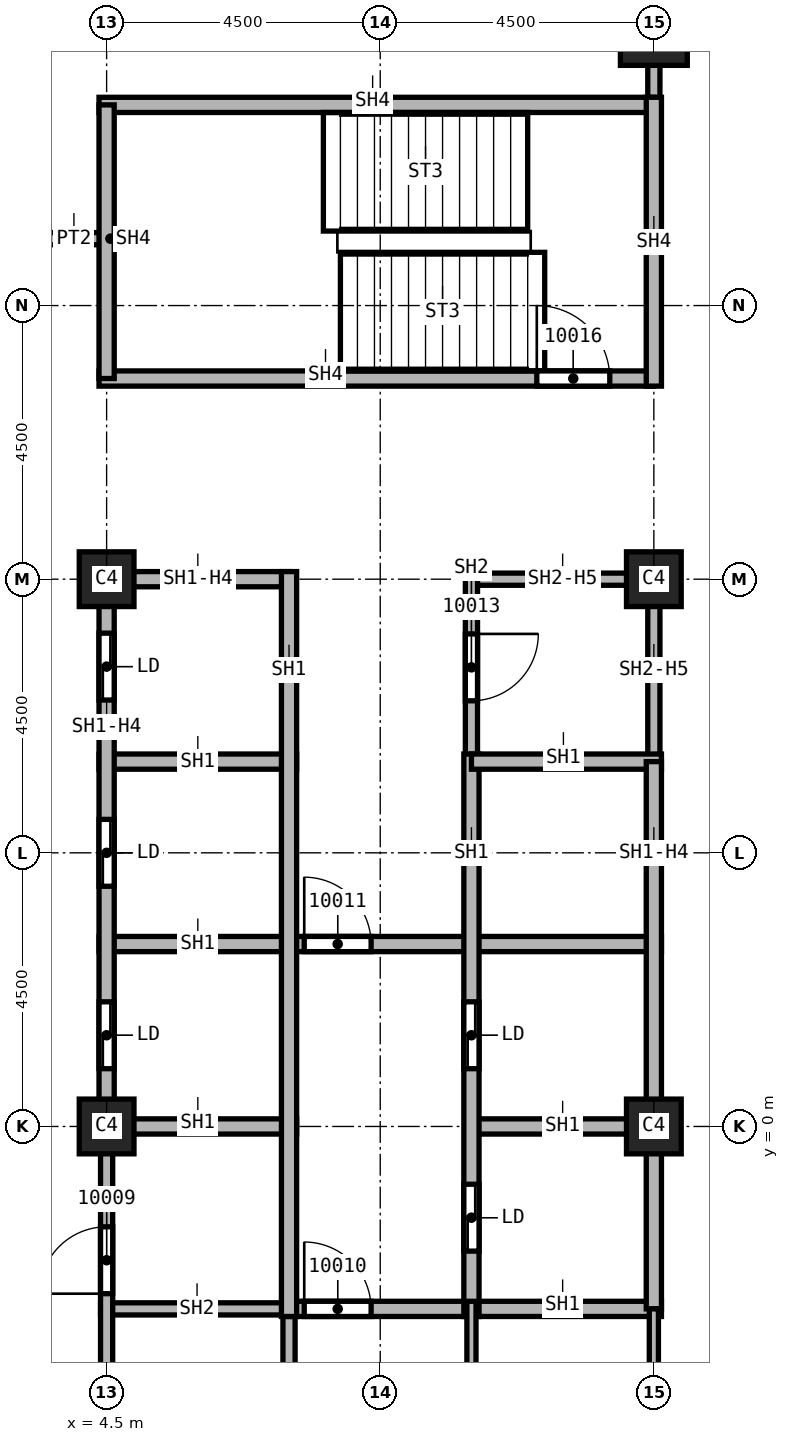
"""IFC4 building model, lengths in metres.
Left out: names, types, materials, properties, quantities, classifications, styles, units other than length and angle.
Written with IfcOpenShell. Run it as: python <this file> out.ifc"""

import sys

from ifc_helpers import new_model, si_unit, direction, frame, frame_2d, origin, origin_2d, place, context, subcontext, project, spatial, rectangle, extrude, element, fill, save


model = new_model("IFC4")
c1 = context("Model", 3, precision=1e-05, world=origin(), true_north=direction((0.0, 1.0)))
c2 = subcontext(c1, "Body", "Model", "MODEL_VIEW")
j1 = project(units=[si_unit("LENGTHUNIT", "METRE"), si_unit("PLANEANGLEUNIT", "RADIAN")], contexts=[c1])
p1 = place(None, origin())
s1 = spatial("IfcSite", under=j1, at=p1, CompositionType="ELEMENT")
p2 = place(p1, origin())
s2 = spatial("IfcBuilding", under=s1, at=p2, CompositionType="ELEMENT")
p3 = place(p2, frame((0.0, 0.0, 170.0)))
s3 = spatial("IfcBuildingStorey", under=s2, at=p3, CompositionType="ELEMENT", Elevation=170.0)
p4 = place(p3, frame((13.5, 18.0, 0.0), z_axis=(0.0, 0.0, 1.0), x_axis=(1.0, 0.0, 0.0)))
e1 = element("IfcColumn", 1, at=p4, inside=s3, PredefinedType="COLUMN", context=c2, shape_type="SweptSolid", body=[
    extrude(rectangle(XDim=1.1, YDim=1.1, at=origin_2d()), origin(), (0.0, 0.0, 1.0), 3.7),
])
for number, where, z_axis, x_axis in (
    (2, (4.5, 0.0, 0.0), (0.0, 0.0, 1.0), (1.0, 0.0, 0.0)),
    (3, (4.5, 9.0, 0.0), (0.0, 0.0, 1.0), (1.0, 0.0, 0.0)),
    (4, (13.5, 0.0, 0.0), (0.0, 0.0, 1.0), (1.0, 0.0, 0.0)),
    (5, (13.5, 9.0, 0.0), (0.0, 0.0, 1.0), (1.0, 0.0, 0.0)),
):
    element("IfcColumn", number, at=place(p3, frame(where, z_axis=z_axis, x_axis=x_axis)), inside=s3, PredefinedType="COLUMN", context=c2, shape_type="SweptSolid", body=[
        extrude(rectangle(XDim=0.9, YDim=0.9, at=origin_2d()), origin(), (0.0, 0.0, 1.0), 3.7),
    ])
p5 = place(p3, frame((3.55, 14.6, 0.0), z_axis=(0.0, 0.0, 1.0), x_axis=(1.0, 0.0, 0.0)))
e6 = element("IfcWall", 6, at=p5, inside=s3, PredefinedType="PARTITIONING", context=c2, shape_type="SweptSolid", body=[
    extrude(rectangle(XDim=0.95, YDim=0.2, at=frame_2d((0.475, 0.0))), origin(), (0.0, 0.0, 1.0), 3.7),
])
p6 = place(p3, frame((13.5, 16.675, 0.0), z_axis=(0.0, 0.0, 1.0), x_axis=(0.0, 1.0, 0.0)))
e7 = element("IfcWall", 7, at=p6, inside=s3, PredefinedType="PARTITIONING", context=c2, shape_type="SweptSolid", body=[
    extrude(rectangle(XDim=6.375, YDim=0.2, at=frame_2d((3.188, 0.0))), origin(), (0.0, 0.0, 1.0), 3.7),
])
p7 = place(p6, frame((3.55, 0.0, 0.0)))
e8 = element("IfcOpeningElement", 8, at=p7, cuts=e7, PredefinedType="OPENING", context=c2, shape_type="SweptSolid", body=[
    extrude(rectangle(XDim=1.0, YDim=2.1, at=frame_2d((0.5, 1.05))), frame((0.0, 0.1, 0.0), z_axis=(0.0, -1.0, 0.0), x_axis=(1.0, 0.0, 0.0)), (0.0, 0.0, 1.0), 0.2),
])
p8 = place(p3, frame((4.4, -3.0, 0.0), z_axis=(0.0, 0.0, 1.0), x_axis=(1.0, 0.0, 0.0)))
e9 = element("IfcWall", 9, at=p8, inside=s3, PredefinedType="SOLIDWALL", context=c2, shape_type="SweptSolid", body=[
    extrude(rectangle(XDim=3.225, YDim=0.2, at=frame_2d((1.613, 0.0))), origin(), (0.0, 0.0, 1.0), 3.7),
])
p9 = place(p3, frame((4.5, -9.1, 0.0), z_axis=(0.0, 0.0, 1.0), x_axis=(0.0, 1.0, 0.0)))
e10 = element("IfcWall", 10, at=p9, inside=s3, PredefinedType="SOLIDWALL", context=c2, shape_type="SweptSolid", body=[
    extrude(rectangle(XDim=9.1, YDim=0.2, at=frame_2d((4.55, 0.0))), origin(), (0.0, 0.0, 1.0), 2.938),
])
p10 = place(p9, frame((0.85, 0.0, 0.0)))
e11 = element("IfcOpeningElement", 11, at=p10, cuts=e10, PredefinedType="OPENING", context=c2, shape_type="SweptSolid", body=[
    extrude(rectangle(XDim=1.1, YDim=2.1, at=frame_2d((0.55, 1.05))), frame((0.0, 0.1, 0.0), z_axis=(0.0, -1.0, 0.0), x_axis=(1.0, 0.0, 0.0)), (0.0, 0.0, 1.0), 0.2),
])
p11 = place(p9, frame((6.35, 0.0, 0.0)))
e12 = element("IfcOpeningElement", 12, at=p11, cuts=e10, PredefinedType="OPENING", context=c2, shape_type="SweptSolid", body=[
    extrude(rectangle(XDim=1.1, YDim=2.1, at=frame_2d((0.55, 1.05))), frame((0.0, 0.1, 0.0), z_axis=(0.0, -1.0, 0.0), x_axis=(1.0, 0.0, 0.0)), (0.0, 0.0, 1.0), 0.2),
])
p12 = place(p3, frame((7.5, -2.875, 0.0), z_axis=(0.0, 0.0, 1.0), x_axis=(0.0, -1.0, 0.0)))
e13 = element("IfcWall", 13, at=p12, inside=s3, PredefinedType="SOLIDWALL", context=c2, shape_type="SweptSolid", body=[
    extrude(rectangle(XDim=6.225, YDim=0.2, at=frame_2d((3.113, 0.0))), origin(), (0.0, 0.0, 1.0), 3.7),
])
p13 = place(p3, frame((10.5, 9.0, 0.0), z_axis=(0.0, 0.0, 1.0), x_axis=(1.0, 0.0, 0.0)))
e14 = element("IfcWall", 14, at=p13, inside=s3, PredefinedType="SOLIDWALL", context=c2, shape_type="SweptSolid", body=[
    extrude(rectangle(XDim=3.0, YDim=0.2, at=frame_2d((1.5, 0.0))), origin(), (0.0, 0.0, 1.0), 2.938),
])
p14 = place(p3, frame((10.5, 9.1, 0.0), z_axis=(0.0, 0.0, 1.0), x_axis=(0.0, -1.0, 0.0)))
e15 = element("IfcWall", 15, at=p14, inside=s3, PredefinedType="SOLIDWALL", context=c2, shape_type="SweptSolid", body=[
    extrude(rectangle(XDim=3.225, YDim=0.2, at=frame_2d((1.613, 0.0))), origin(), (0.0, 0.0, 1.0), 3.7),
])
p15 = place(p14, frame((1.0, 0.0, 0.0)))
e16 = element("IfcOpeningElement", 16, at=p15, cuts=e15, PredefinedType="OPENING", context=c2, shape_type="SweptSolid", body=[
    extrude(rectangle(XDim=1.1, YDim=2.1, at=frame_2d((0.55, 1.05))), frame((0.0, 0.1, 0.0), z_axis=(0.0, -1.0, 0.0), x_axis=(1.0, 0.0, 0.0)), (0.0, 0.0, 1.0), 0.2),
])
p16 = place(p3, frame((13.5, 9.1, 0.0), z_axis=(0.0, 0.0, 1.0), x_axis=(0.0, -1.0, 0.0)))
e17 = element("IfcWall", 17, at=p16, inside=s3, PredefinedType="SOLIDWALL", context=c2, shape_type="SweptSolid", body=[
    extrude(rectangle(XDim=3.1, YDim=0.2, at=frame_2d((1.55, 0.0))), origin(), (0.0, 0.0, 1.0), 2.938),
])
p17 = place(p3, frame((4.375, 0.0, 0.0), z_axis=(0.0, 0.0, 1.0), x_axis=(1.0, 0.0, 0.0)))
e18 = element("IfcWall", 18, at=p17, inside=s3, PredefinedType="SOLIDWALL", context=c2, shape_type="SweptSolid", body=[
    extrude(rectangle(XDim=3.25, YDim=0.25, at=frame_2d((1.625, 0.0))), origin(), (0.0, 0.0, 1.0), 3.7),
])
p18 = place(p3, frame((4.375, 3.0, 0.0), z_axis=(0.0, 0.0, 1.0), x_axis=(1.0, 0.0, 0.0)))
e19 = element("IfcWall", 19, at=p18, inside=s3, PredefinedType="SOLIDWALL", context=c2, shape_type="SweptSolid", body=[
    extrude(rectangle(XDim=9.25, YDim=0.25, at=frame_2d((4.625, 0.0))), origin(), (0.0, 0.0, 1.0), 3.7),
])
p19 = place(p18, frame((3.375, 0.0, 0.0)))
e20 = element("IfcOpeningElement", 20, at=p19, cuts=e19, PredefinedType="OPENING", context=c2, shape_type="SweptSolid", body=[
    extrude(rectangle(XDim=1.1, YDim=2.1, at=frame_2d((0.55, 1.05))), frame((0.0, 0.125, 0.0), z_axis=(0.0, -1.0, 0.0), x_axis=(1.0, 0.0, 0.0)), (0.0, 0.0, 1.0), 0.25),
])
p20 = place(p3, frame((4.375, 6.0, 0.0), z_axis=(0.0, 0.0, 1.0), x_axis=(1.0, 0.0, 0.0)))
e21 = element("IfcWall", 21, at=p20, inside=s3, PredefinedType="SOLIDWALL", context=c2, shape_type="SweptSolid", body=[
    extrude(rectangle(XDim=3.25, YDim=0.25, at=frame_2d((1.625, 0.0))), origin(), (0.0, 0.0, 1.0), 3.7),
])
p21 = place(p3, frame((4.5, 0.0, 0.0), z_axis=(0.0, 0.0, 1.0), x_axis=(0.0, 1.0, 0.0)))
e22 = element("IfcWall", 22, at=p21, inside=s3, PredefinedType="SOLIDWALL", context=c2, shape_type="SweptSolid", body=[
    extrude(rectangle(XDim=9.125, YDim=0.25, at=frame_2d((4.562, 0.0))), origin(), (0.0, 0.0, 1.0), 2.938),
])
p22 = place(p21, frame((0.95, 0.0, 0.0)))
e23 = element("IfcOpeningElement", 23, at=p22, cuts=e22, PredefinedType="OPENING", context=c2, shape_type="SweptSolid", body=[
    extrude(rectangle(XDim=1.1, YDim=2.1, at=frame_2d((0.55, 1.05))), frame((0.0, 0.125, 0.0), z_axis=(0.0, -1.0, 0.0), x_axis=(1.0, 0.0, 0.0)), (0.0, 0.0, 1.0), 0.25),
])
p23 = place(p21, frame((3.95, 0.0, 0.0)))
e24 = element("IfcOpeningElement", 24, at=p23, cuts=e22, PredefinedType="OPENING", context=c2, shape_type="SweptSolid", body=[
    extrude(rectangle(XDim=1.1, YDim=2.1, at=frame_2d((0.55, 1.05))), frame((0.0, 0.125, 0.0), z_axis=(0.0, -1.0, 0.0), x_axis=(1.0, 0.0, 0.0)), (0.0, 0.0, 1.0), 0.25),
])
p24 = place(p21, frame((7.012, 0.0, 0.0)))
e25 = element("IfcOpeningElement", 25, at=p24, cuts=e22, PredefinedType="OPENING", context=c2, shape_type="SweptSolid", body=[
    extrude(rectangle(XDim=1.1, YDim=2.1, at=frame_2d((0.55, 1.05))), frame((0.0, 0.125, 0.0), z_axis=(0.0, -1.0, 0.0), x_axis=(1.0, 0.0, 0.0)), (0.0, 0.0, 1.0), 0.25),
])
p25 = place(p3, frame((4.5, 9.0, 0.0), z_axis=(0.0, 0.0, 1.0), x_axis=(1.0, 0.0, 0.0)))
e26 = element("IfcWall", 26, at=p25, inside=s3, PredefinedType="SOLIDWALL", context=c2, shape_type="SweptSolid", body=[
    extrude(rectangle(XDim=3.0, YDim=0.25, at=frame_2d((1.5, 0.0))), origin(), (0.0, 0.0, 1.0), 2.938),
])
p26 = place(p3, frame((7.5, -3.0, 0.0), z_axis=(0.0, 0.0, 1.0), x_axis=(1.0, 0.0, 0.0)))
e27 = element("IfcWall", 27, at=p26, inside=s3, PredefinedType="SOLIDWALL", context=c2, shape_type="SweptSolid", body=[
    extrude(rectangle(XDim=6.125, YDim=0.25, at=frame_2d((3.062, 0.0))), origin(), (0.0, 0.0, 1.0), 3.7),
])
p27 = place(p26, frame((0.25, 0.0, 0.0)))
e28 = element("IfcOpeningElement", 28, at=p27, cuts=e27, PredefinedType="OPENING", context=c2, shape_type="SweptSolid", body=[
    extrude(rectangle(XDim=1.1, YDim=2.1, at=frame_2d((0.55, 1.05))), frame((0.0, 0.125, 0.0), z_axis=(0.0, -1.0, 0.0), x_axis=(1.0, 0.0, 0.0)), (0.0, 0.0, 1.0), 0.25),
])
p28 = place(p3, frame((7.5, 9.125, 0.0), z_axis=(0.0, 0.0, 1.0), x_axis=(0.0, -1.0, 0.0)))
e29 = element("IfcWall", 29, at=p28, inside=s3, PredefinedType="SOLIDWALL", context=c2, shape_type="SweptSolid", body=[
    extrude(rectangle(XDim=12.25, YDim=0.25, at=frame_2d((6.125, 0.0))), origin(), (0.0, 0.0, 1.0), 3.7),
])
p29 = place(p3, frame((10.5, 0.0, 0.0), z_axis=(0.0, 0.0, 1.0), x_axis=(1.0, 0.0, 0.0)))
e30 = element("IfcWall", 30, at=p29, inside=s3, PredefinedType="SOLIDWALL", context=c2, shape_type="SweptSolid", body=[
    extrude(rectangle(XDim=3.125, YDim=0.25, at=frame_2d((1.562, 0.0))), origin(), (0.0, 0.0, 1.0), 3.7),
])
p30 = place(p3, frame((10.5, 6.125, 0.0), z_axis=(0.0, 0.0, 1.0), x_axis=(0.0, -1.0, 0.0)))
e31 = element("IfcWall", 31, at=p30, inside=s3, PredefinedType="SOLIDWALL", context=c2, shape_type="SweptSolid", body=[
    extrude(rectangle(XDim=9.25, YDim=0.25, at=frame_2d((4.625, 0.0))), origin(), (0.0, 0.0, 1.0), 3.7),
])
p31 = place(p30, frame((7.075, 0.0, 0.0)))
e32 = element("IfcOpeningElement", 32, at=p31, cuts=e31, PredefinedType="OPENING", context=c2, shape_type="SweptSolid", body=[
    extrude(rectangle(XDim=1.1, YDim=2.1, at=frame_2d((0.55, 1.05))), frame((0.0, 0.125, 0.0), z_axis=(0.0, -1.0, 0.0), x_axis=(1.0, 0.0, 0.0)), (0.0, 0.0, 1.0), 0.25),
])
p32 = place(p30, frame((4.075, 0.0, 0.0)))
e33 = element("IfcOpeningElement", 33, at=p32, cuts=e31, PredefinedType="OPENING", context=c2, shape_type="SweptSolid", body=[
    extrude(rectangle(XDim=1.1, YDim=2.1, at=frame_2d((0.55, 1.05))), frame((0.0, 0.125, 0.0), z_axis=(0.0, -1.0, 0.0), x_axis=(1.0, 0.0, 0.0)), (0.0, 0.0, 1.0), 0.25),
])
p33 = place(p3, frame((10.5, 6.0, 0.0), z_axis=(0.0, 0.0, 1.0), x_axis=(1.0, 0.0, 0.0)))
e34 = element("IfcWall", 34, at=p33, inside=s3, PredefinedType="SOLIDWALL", context=c2, shape_type="SweptSolid", body=[
    extrude(rectangle(XDim=3.125, YDim=0.25, at=frame_2d((1.562, 0.0))), origin(), (0.0, 0.0, 1.0), 3.7),
])
p34 = place(p3, frame((13.5, 6.0, 0.0), z_axis=(0.0, 0.0, 1.0), x_axis=(0.0, -1.0, 0.0)))
e35 = element("IfcWall", 35, at=p34, inside=s3, PredefinedType="SOLIDWALL", context=c2, shape_type="SweptSolid", body=[
    extrude(rectangle(XDim=9.0, YDim=0.25, at=frame_2d((4.5, 0.0))), origin(), (0.0, 0.0, 1.0), 2.938),
])
p35 = place(p3, frame((4.375, 12.3, 0.0), z_axis=(0.0, 0.0, 1.0), x_axis=(1.0, 0.0, 0.0)))
e36 = element("IfcWall", 36, at=p35, inside=s3, PredefinedType="SOLIDWALL", context=c2, shape_type="SweptSolid", body=[
    extrude(rectangle(XDim=9.125, YDim=0.25, at=frame_2d((4.562, 0.0))), origin(), (0.0, 0.0, 1.0), 3.7),
])
p36 = place(p35, frame((7.2, 0.0, 0.0)))
e37 = element("IfcOpeningElement", 37, at=p36, cuts=e36, PredefinedType="OPENING", context=c2, shape_type="SweptSolid", body=[
    extrude(rectangle(XDim=1.2, YDim=2.1, at=frame_2d((0.6, 1.05))), frame((0.0, 0.125, 0.0), z_axis=(0.0, -1.0, 0.0), x_axis=(1.0, 0.0, 0.0)), (0.0, 0.0, 1.0), 0.25),
])
p37 = place(p3, frame((4.375, 16.8, 0.0), z_axis=(0.0, 0.0, 1.0), x_axis=(1.0, 0.0, 0.0)))
e38 = element("IfcWall", 38, at=p37, inside=s3, PredefinedType="SOLIDWALL", context=c2, shape_type="SweptSolid", body=[
    extrude(rectangle(XDim=9.125, YDim=0.25, at=frame_2d((4.562, 0.0))), origin(), (0.0, 0.0, 1.0), 3.7),
])
p38 = place(p3, frame((4.5, 12.3, 0.0), z_axis=(0.0, 0.0, 1.0), x_axis=(0.0, 1.0, 0.0)))
e39 = element("IfcWall", 39, at=p38, inside=s3, PredefinedType="SOLIDWALL", context=c2, shape_type="SweptSolid", body=[
    extrude(rectangle(XDim=4.5, YDim=0.25, at=frame_2d((2.25, 0.0))), origin(), (0.0, 0.0, 1.0), 3.7),
])
p39 = place(p3, frame((13.5, 12.175, 0.0), z_axis=(0.0, 0.0, 1.0), x_axis=(0.0, 1.0, 0.0)))
e40 = element("IfcWall", 40, at=p39, inside=s3, PredefinedType="SOLIDWALL", context=c2, shape_type="SweptSolid", body=[
    extrude(rectangle(XDim=4.75, YDim=0.25, at=frame_2d((2.375, 0.0))), origin(), (0.0, 0.0, 1.0), 3.7),
])
p40 = place(p3, frame((10.5, -2.875, 0.0), z_axis=(0.0, 0.0, 1.0), x_axis=(0.0, -1.0, 0.0)))
e41 = element("IfcWall", 41, at=p40, inside=s3, PredefinedType="PARTITIONING", context=c2, shape_type="SweptSolid", body=[
    extrude(rectangle(XDim=6.2, YDim=0.15, at=frame_2d((3.1, 0.0))), origin(), (0.0, 0.0, 1.0), 3.7),
])
p41 = place(p40, frame((4.45, 0.0, 0.0)))
e42 = element("IfcOpeningElement", 42, at=p41, cuts=e41, PredefinedType="OPENING", context=c2, shape_type="SweptSolid", body=[
    extrude(rectangle(XDim=0.9, YDim=2.1, at=frame_2d((0.45, 1.05))), frame((0.0, 0.075, 0.0), z_axis=(0.0, -1.0, 0.0), x_axis=(1.0, 0.0, 0.0)), (0.0, 0.0, 1.0), 0.15),
])
p42 = place(p3, frame((13.5, -3.0, 0.0), z_axis=(0.0, 0.0, 1.0), x_axis=(0.0, -1.0, 0.0)))
e43 = element("IfcWall", 43, at=p42, inside=s3, PredefinedType="PARTITIONING", context=c2, shape_type="SweptSolid", body=[
    extrude(rectangle(XDim=6.075, YDim=0.15, at=frame_2d((3.038, 0.0))), origin(), (0.0, 0.0, 1.0), 2.938),
])
p43 = place(p11, origin())
e44 = element("IfcDoor", 44, at=p43, inside=s3, OperationType="SINGLE_SWING_RIGHT", PredefinedType="DOOR", context=c2, shape_type="SweptSolid", body=[
    extrude(rectangle(XDim=1.1, YDim=2.1, at=frame_2d((0.55, 1.05))), frame((0.0, 0.025, 0.0), z_axis=(0.0, -1.0, 0.0), x_axis=(1.0, 0.0, 0.0)), (0.0, 0.0, 1.0), 0.05),
])
fill(e12, e44)
p44 = place(p27, origin())
e45 = element("IfcDoor", 45, at=p44, inside=s3, OperationType="SINGLE_SWING_LEFT", PredefinedType="DOOR", context=c2, shape_type="SweptSolid", body=[
    extrude(rectangle(XDim=1.1, YDim=2.1, at=frame_2d((0.55, 1.05))), frame((0.0, 0.025, 0.0), z_axis=(0.0, -1.0, 0.0), x_axis=(1.0, 0.0, 0.0)), (0.0, 0.0, 1.0), 0.05),
])
fill(e28, e45)
p45 = place(p19, origin())
e46 = element("IfcDoor", 46, at=p45, inside=s3, OperationType="SINGLE_SWING_RIGHT", PredefinedType="DOOR", context=c2, shape_type="SweptSolid", body=[
    extrude(rectangle(XDim=1.1, YDim=2.1, at=frame_2d((0.55, 1.05))), frame((0.0, 0.025, 0.0), z_axis=(0.0, -1.0, 0.0), x_axis=(1.0, 0.0, 0.0)), (0.0, 0.0, 1.0), 0.05),
])
fill(e20, e46)
p46 = place(p15, origin())
e47 = element("IfcDoor", 47, at=p46, inside=s3, OperationType="SINGLE_SWING_RIGHT", PredefinedType="DOOR", context=c2, shape_type="SweptSolid", body=[
    extrude(rectangle(XDim=1.1, YDim=2.1, at=frame_2d((0.55, 1.05))), frame((0.0, 0.025, 0.0), z_axis=(0.0, -1.0, 0.0), x_axis=(1.0, 0.0, 0.0)), (0.0, 0.0, 1.0), 0.05),
])
fill(e16, e47)
p47 = place(p36, origin())
e48 = element("IfcDoor", 48, at=p47, inside=s3, OperationType="SINGLE_SWING_LEFT", PredefinedType="DOOR", context=c2, shape_type="SweptSolid", body=[
    extrude(rectangle(XDim=1.2, YDim=2.1, at=frame_2d((0.6, 1.05))), frame((0.0, 0.025, 0.0), z_axis=(0.0, -1.0, 0.0), x_axis=(1.0, 0.0, 0.0)), (0.0, 0.0, 1.0), 0.05),
])
fill(e37, e48)
p48 = place(p22, origin())
e49 = element("IfcDoor", 49, at=p48, inside=s3, OperationType="SLIDING_TO_LEFT", PredefinedType="DOOR", context=c2, shape_type="SweptSolid", body=[
    extrude(rectangle(XDim=1.1, YDim=2.1, at=frame_2d((0.55, 1.05))), frame((0.0, 0.025, 0.0), z_axis=(0.0, -1.0, 0.0), x_axis=(1.0, 0.0, 0.0)), (0.0, 0.0, 1.0), 0.05),
])
fill(e23, e49)
p49 = place(p23, origin())
e50 = element("IfcDoor", 50, at=p49, inside=s3, OperationType="SLIDING_TO_LEFT", PredefinedType="DOOR", context=c2, shape_type="SweptSolid", body=[
    extrude(rectangle(XDim=1.1, YDim=2.1, at=frame_2d((0.55, 1.05))), frame((0.0, 0.025, 0.0), z_axis=(0.0, -1.0, 0.0), x_axis=(1.0, 0.0, 0.0)), (0.0, 0.0, 1.0), 0.05),
])
fill(e24, e50)
p50 = place(p24, origin())
e51 = element("IfcDoor", 51, at=p50, inside=s3, OperationType="SLIDING_TO_LEFT", PredefinedType="DOOR", context=c2, shape_type="SweptSolid", body=[
    extrude(rectangle(XDim=1.1, YDim=2.1, at=frame_2d((0.55, 1.05))), frame((0.0, 0.025, 0.0), z_axis=(0.0, -1.0, 0.0), x_axis=(1.0, 0.0, 0.0)), (0.0, 0.0, 1.0), 0.05),
])
fill(e25, e51)
p51 = place(p31, origin())
e52 = element("IfcDoor", 52, at=p51, inside=s3, OperationType="SLIDING_TO_LEFT", PredefinedType="DOOR", context=c2, shape_type="SweptSolid", body=[
    extrude(rectangle(XDim=1.1, YDim=2.1, at=frame_2d((0.55, 1.05))), frame((0.0, 0.025, 0.0), z_axis=(0.0, -1.0, 0.0), x_axis=(1.0, 0.0, 0.0)), (0.0, 0.0, 1.0), 0.05),
])
fill(e32, e52)
p52 = place(p32, origin())
e53 = element("IfcDoor", 53, at=p52, inside=s3, OperationType="SLIDING_TO_LEFT", PredefinedType="DOOR", context=c2, shape_type="SweptSolid", body=[
    extrude(rectangle(XDim=1.1, YDim=2.1, at=frame_2d((0.55, 1.05))), frame((0.0, 0.025, 0.0), z_axis=(0.0, -1.0, 0.0), x_axis=(1.0, 0.0, 0.0)), (0.0, 0.0, 1.0), 0.05),
])
fill(e33, e53)
save(model, sys.argv[1])
